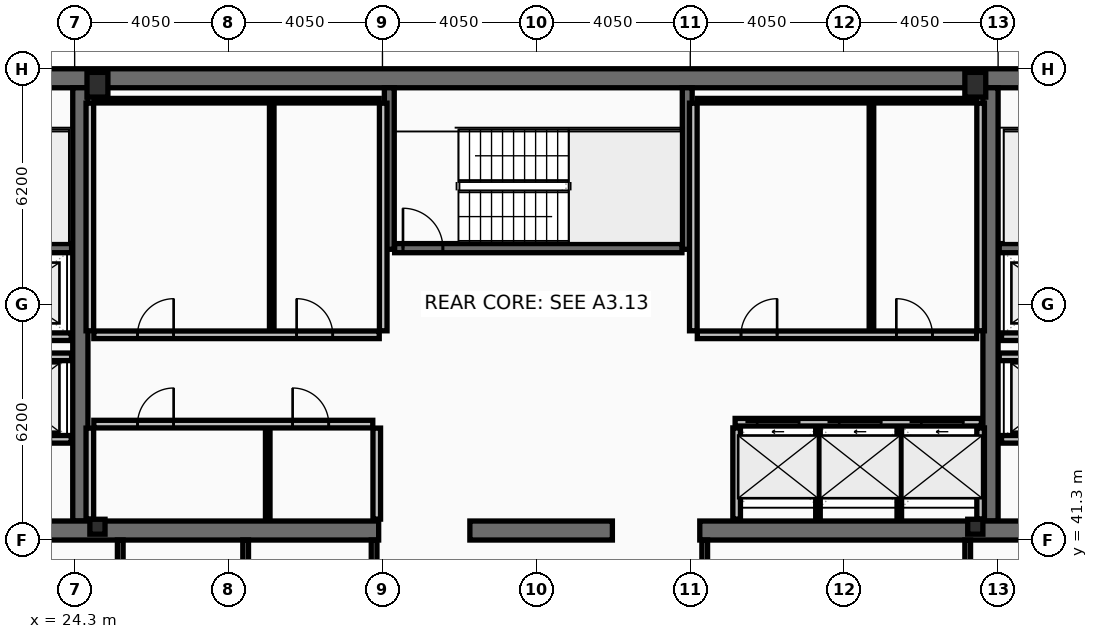
"""IFC4 building model, lengths in metres.
Left out: names, types, materials, properties, quantities, classifications, styles, units other than length and angle.
Written with IfcOpenShell. Run it as: python <this file> out.ifc"""

import sys

from ifc_helpers import new_model, si_unit, direction, frame, frame_2d, origin, origin_2d, place, context, subcontext, project, spatial, rectangle, hollow_rectangle, i_section, extrude, element, fill, save


model = new_model("IFC4")
c1 = context("Model", 3, precision=1e-05, world=origin(), true_north=direction((0.0, 1.0)))
c2 = subcontext(c1, "Body", "Model", "MODEL_VIEW")
j1 = project(units=[si_unit("LENGTHUNIT", "METRE"), si_unit("PLANEANGLEUNIT", "RADIAN")], contexts=[c1])
p1 = place(None, origin())
s1 = spatial("IfcSite", under=j1, at=p1, CompositionType="ELEMENT")
p2 = place(p1, origin())
s2 = spatial("IfcBuilding", under=s1, at=p2, CompositionType="ELEMENT")
p3 = place(p2, frame((0.0, 0.0, 329.0)))
s3 = spatial("IfcBuildingStorey", under=s2, at=p3, CompositionType="ELEMENT", Elevation=329.0)
p4 = place(p3, frame((16.2, 53.45, 0.0), z_axis=(0.0, 0.0, 1.0), x_axis=(1.0, 0.0, 0.0)))
e1 = element("IfcWall", 1, at=p4, inside=s3, PredefinedType="SHEAR", context=c2, shape_type="SweptSolid", body=[
    extrude(rectangle(XDim=40.5, YDim=0.5, at=frame_2d((20.25, 0.0))), origin(), (0.0, 0.0, 1.0), 3.44),
])
for number, where, z_axis, x_axis in (
    (2, (24.45, 41.8, 0.0), (0.0, 0.0, 1.0), (0.0, 1.0, 0.0)),
    (3, (48.4, 41.8, 0.0), (0.0, 0.0, 1.0), (0.0, 1.0, 0.0)),
):
    element("IfcWall", number, at=place(p3, frame(where, z_axis=z_axis, x_axis=x_axis)), inside=s3, PredefinedType="SHEAR", context=c2, shape_type="SweptSolid", body=[
        extrude(rectangle(XDim=11.4, YDim=0.4, at=frame_2d((5.7, 0.0))), origin(), (0.0, 0.0, 1.0), 3.44),
    ])
p5 = place(p3, frame((32.3, 41.55, 0.0), z_axis=(0.0, 0.0, 1.0), x_axis=(-1.0, 0.0, 0.0)))
e4 = element("IfcWall", 4, at=p5, inside=s3, PredefinedType="SHEAR", context=c2, shape_type="SweptSolid", body=[
    extrude(rectangle(XDim=11.45, YDim=0.5, at=frame_2d((5.725, 0.0))), origin(), (0.0, 0.0, 1.0), 3.44),
])
p6 = place(p3, frame((38.45, 41.55, 0.0), z_axis=(0.0, 0.0, 1.0), x_axis=(-1.0, 0.0, 0.0)))
e5 = element("IfcWall", 5, at=p6, inside=s3, PredefinedType="SHEAR", context=c2, shape_type="SweptSolid", body=[
    extrude(rectangle(XDim=3.75, YDim=0.5, at=frame_2d((1.875, 0.0))), origin(), (0.0, 0.0, 1.0), 3.44),
])
p7 = place(p3, frame((52.05, 41.55, 0.0), z_axis=(0.0, 0.0, 1.0), x_axis=(-1.0, 0.0, 0.0)))
e6 = element("IfcWall", 6, at=p7, inside=s3, PredefinedType="SHEAR", context=c2, shape_type="SweptSolid", body=[
    extrude(rectangle(XDim=11.3, YDim=0.5, at=frame_2d((5.65, 0.0))), origin(), (0.0, 0.0, 1.0), 3.44),
])
for number, where, z_axis, x_axis in (
    (7, (32.58, 48.95, 0.0), (0.0, 0.0, 1.0), (0.0, 1.0, 0.0)),
    (8, (40.42, 48.95, 0.0), (0.0, 0.0, 1.0), (0.0, 1.0, 0.0)),
):
    element("IfcWall", number, at=place(p3, frame(where, z_axis=z_axis, x_axis=x_axis)), inside=s3, PredefinedType="SHEAR", context=c2, shape_type="SweptSolid", body=[
        extrude(rectangle(XDim=4.25, YDim=0.26, at=frame_2d((2.125, 0.0))), origin(), (0.0, 0.0, 1.0), 3.44),
    ])
p8 = place(p3, frame((16.7, 48.98, 0.0), z_axis=(0.0, 0.0, 1.0), x_axis=(1.0, 0.0, 0.0)))
e9 = element("IfcWall", 9, at=p8, inside=s3, PredefinedType="SHEAR", context=c2, shape_type="SweptSolid", body=[
    extrude(rectangle(XDim=7.52, YDim=0.24, at=frame_2d((3.76, 0.0))), origin(), (0.0, 0.0, 1.0), 3.44),
])
p9 = place(p8, frame((0.22, 0.0, 0.0)))
e10 = element("IfcOpeningElement", 10, at=p9, cuts=e9, PredefinedType="OPENING", context=c2, shape_type="SweptSolid", body=[
    extrude(rectangle(XDim=1.05, YDim=2.15, at=frame_2d((0.525, 1.075))), frame((0.0, 0.13, 0.0), z_axis=(0.0, -1.0, 0.0), x_axis=(1.0, 0.0, 0.0)), (0.0, 0.0, 1.0), 0.26),
])
p10 = place(p3, frame((48.63, 48.98, 0.0), z_axis=(0.0, 0.0, 1.0), x_axis=(1.0, 0.0, 0.0)))
e11 = element("IfcWall", 11, at=p10, inside=s3, PredefinedType="SHEAR", context=c2, shape_type="SweptSolid", body=[
    extrude(rectangle(XDim=7.57, YDim=0.24, at=frame_2d((3.785, 0.0))), origin(), (0.0, 0.0, 1.0), 3.44),
])
p11 = place(p10, frame((6.3, 0.0, 0.0)))
e12 = element("IfcOpeningElement", 12, at=p11, cuts=e11, PredefinedType="OPENING", context=c2, shape_type="SweptSolid", body=[
    extrude(rectangle(XDim=1.05, YDim=2.15, at=frame_2d((0.525, 1.075))), frame((0.0, 0.13, 0.0), z_axis=(0.0, -1.0, 0.0), x_axis=(1.0, 0.0, 0.0)), (0.0, 0.0, 1.0), 0.26),
])
p12 = place(p3, frame((32.72, 48.98, 0.0), z_axis=(0.0, 0.0, 1.0), x_axis=(1.0, 0.0, 0.0)))
e13 = element("IfcWall", 13, at=p12, inside=s3, PredefinedType="SHEAR", context=c2, shape_type="SweptSolid", body=[
    extrude(rectangle(XDim=7.56, YDim=0.24, at=frame_2d((3.78, 0.0))), origin(), (0.0, 0.0, 1.0), 3.44),
])
p13 = place(p12, frame((0.22, 0.0, 0.0)))
e14 = element("IfcOpeningElement", 14, at=p13, cuts=e13, PredefinedType="OPENING", context=c2, shape_type="SweptSolid", body=[
    extrude(rectangle(XDim=1.05, YDim=2.15, at=frame_2d((0.525, 1.075))), frame((0.0, 0.13, 0.0), z_axis=(0.0, -1.0, 0.0), x_axis=(1.0, 0.0, 0.0)), (0.0, 0.0, 1.0), 0.26),
])
for number, where, z_axis, x_axis in (
    (15, (24.9, 53.28, 0.0), (0.0, 0.0, 1.0), (1.0, 0.0, 0.0)),
    (16, (48.0, 53.28, 0.0), (0.0, 0.0, 1.0), (1.0, 0.0, 0.0)),
):
    element("IfcColumn", number, at=place(p3, frame(where, z_axis=z_axis, x_axis=x_axis)), inside=s3, PredefinedType="COLUMN", context=c2, shape_type="SweptSolid", body=[
        extrude(hollow_rectangle(XDim=0.55, YDim=0.65, WallThickness=0.04, at=origin_2d()), origin(), (0.0, 0.0, 1.0), 3.6),
    ])
for number, where, z_axis, x_axis in (
    (17, (24.9, 41.65, 0.0), (0.0, 0.0, 1.0), (1.0, 0.0, 0.0)),
    (18, (48.0, 41.65, 0.0), (0.0, 0.0, 1.0), (1.0, 0.0, 0.0)),
):
    element("IfcColumn", number, at=place(p3, frame(where, z_axis=z_axis, x_axis=x_axis)), inside=s3, PredefinedType="COLUMN", context=c2, shape_type="SweptSolid", body=[
        extrude(i_section(OverallWidth=0.399, OverallDepth=0.393, WebThickness=0.023, FlangeThickness=0.037, at=origin_2d()), origin(), (0.0, 0.0, 1.0), 3.6),
    ])
p14 = place(p3, frame((41.68, 44.4, 0.0), z_axis=(0.0, 0.0, 1.0), x_axis=(1.0, 0.0, 0.0)))
e19 = element("IfcWall", 19, at=p14, inside=s3, PredefinedType="PARTITIONING", context=c2, shape_type="SweptSolid", body=[
    extrude(rectangle(XDim=6.48, YDim=0.2, at=frame_2d((3.24, 0.0))), origin(), (0.0, 0.0, 1.0), 3.44),
])
p15 = place(p14, frame((0.58, 0.0, 0.0)))
e20 = element("IfcOpeningElement", 20, at=p15, cuts=e19, PredefinedType="OPENING", context=c2, shape_type="SweptSolid", body=[
    extrude(rectangle(XDim=1.1, YDim=2.18, at=frame_2d((0.55, 1.09))), frame((0.0, 0.11, 0.0), z_axis=(0.0, -1.0, 0.0), x_axis=(1.0, 0.0, 0.0)), (0.0, 0.0, 1.0), 0.22),
])
p16 = place(p14, frame((2.74, 0.0, 0.0)))
e21 = element("IfcOpeningElement", 21, at=p16, cuts=e19, PredefinedType="OPENING", context=c2, shape_type="SweptSolid", body=[
    extrude(rectangle(XDim=1.1, YDim=2.18, at=frame_2d((0.55, 1.09))), frame((0.0, 0.11, 0.0), z_axis=(0.0, -1.0, 0.0), x_axis=(1.0, 0.0, 0.0)), (0.0, 0.0, 1.0), 0.22),
])
p17 = place(p14, frame((4.9, 0.0, 0.0)))
e22 = element("IfcOpeningElement", 22, at=p17, cuts=e19, PredefinedType="OPENING", context=c2, shape_type="SweptSolid", body=[
    extrude(rectangle(XDim=1.1, YDim=2.18, at=frame_2d((0.55, 1.09))), frame((0.0, 0.11, 0.0), z_axis=(0.0, -1.0, 0.0), x_axis=(1.0, 0.0, 0.0)), (0.0, 0.0, 1.0), 0.22),
])
p18 = place(p3, frame((51.61, 43.95, 0.0), z_axis=(0.0, 0.0, 1.0), x_axis=(-1.0, 0.0, 0.0)))
e23 = element("IfcWall", 23, at=p18, inside=s3, PredefinedType="PARTITIONING", context=c2, shape_type="SweptSolid", body=[
    extrude(rectangle(XDim=2.92, YDim=0.2, at=frame_2d((1.46, 0.0))), origin(), (0.0, 0.0, 1.0), 3.44),
])
p19 = place(p18, frame((0.81, 0.0, 0.0)))
e24 = element("IfcOpeningElement", 24, at=p19, cuts=e23, PredefinedType="OPENING", context=c2, shape_type="SweptSolid", body=[
    extrude(rectangle(XDim=1.3, YDim=2.18, at=frame_2d((0.65, 1.09))), frame((0.0, 0.11, 0.0), z_axis=(0.0, -1.0, 0.0), x_axis=(1.0, 0.0, 0.0)), (0.0, 0.0, 1.0), 0.22),
])
p20 = place(p3, frame((24.21, 43.95, 0.0), z_axis=(0.0, 0.0, 1.0), x_axis=(-1.0, 0.0, 0.0)))
e25 = element("IfcWall", 25, at=p20, inside=s3, PredefinedType="PARTITIONING", context=c2, shape_type="SweptSolid", body=[
    extrude(rectangle(XDim=2.97, YDim=0.2, at=frame_2d((1.485, 0.0))), origin(), (0.0, 0.0, 1.0), 3.44),
])
p21 = place(p20, frame((0.86, 0.0, 0.0)))
e26 = element("IfcOpeningElement", 26, at=p21, cuts=e25, PredefinedType="OPENING", context=c2, shape_type="SweptSolid", body=[
    extrude(rectangle(XDim=1.3, YDim=2.18, at=frame_2d((0.65, 1.09))), frame((0.0, 0.11, 0.0), z_axis=(0.0, -1.0, 0.0), x_axis=(1.0, 0.0, 0.0)), (0.0, 0.0, 1.0), 0.22),
])
p22 = place(p3, frame((51.61, 46.65, 0.0), z_axis=(0.0, 0.0, 1.0), x_axis=(-1.0, 0.0, 0.0)))
e27 = element("IfcWall", 27, at=p22, inside=s3, PredefinedType="PARTITIONING", context=c2, shape_type="SweptSolid", body=[
    extrude(rectangle(XDim=2.92, YDim=0.2, at=frame_2d((1.46, 0.0))), origin(), (0.0, 0.0, 1.0), 3.44),
])
p23 = place(p22, frame((0.86, 0.0, 0.0)))
e28 = element("IfcOpeningElement", 28, at=p23, cuts=e27, PredefinedType="OPENING", context=c2, shape_type="SweptSolid", body=[
    extrude(rectangle(XDim=1.2, YDim=2.18, at=frame_2d((0.6, 1.09))), frame((0.0, 0.11, 0.0), z_axis=(0.0, -1.0, 0.0), x_axis=(1.0, 0.0, 0.0)), (0.0, 0.0, 1.0), 0.22),
])
p24 = place(p3, frame((24.21, 46.65, 0.0), z_axis=(0.0, 0.0, 1.0), x_axis=(-1.0, 0.0, 0.0)))
e29 = element("IfcWall", 29, at=p24, inside=s3, PredefinedType="PARTITIONING", context=c2, shape_type="SweptSolid", body=[
    extrude(rectangle(XDim=2.97, YDim=0.2, at=frame_2d((1.485, 0.0))), origin(), (0.0, 0.0, 1.0), 3.44),
])
p25 = place(p24, frame((0.91, 0.0, 0.0)))
e30 = element("IfcOpeningElement", 30, at=p25, cuts=e29, PredefinedType="OPENING", context=c2, shape_type="SweptSolid", body=[
    extrude(rectangle(XDim=1.2, YDim=2.18, at=frame_2d((0.6, 1.09))), frame((0.0, 0.11, 0.0), z_axis=(0.0, -1.0, 0.0), x_axis=(1.0, 0.0, 0.0)), (0.0, 0.0, 1.0), 0.22),
])
p26 = place(p3, frame((21.2, 46.12, 0.0), z_axis=(0.0, 0.0, 1.0), x_axis=(1.0, 0.0, 0.0)))
e31 = element("IfcWall", 31, at=p26, inside=s3, PredefinedType="PARTITIONING", context=c2, shape_type="SweptSolid", body=[
    extrude(rectangle(XDim=3.02, YDim=0.2, at=frame_2d((1.51, 0.0))), origin(), (0.0, 0.0, 1.0), 3.44),
])
p27 = place(p3, frame((48.63, 46.12, 0.0), z_axis=(0.0, 0.0, 1.0), x_axis=(1.0, 0.0, 0.0)))
e32 = element("IfcWall", 32, at=p27, inside=s3, PredefinedType="PARTITIONING", context=c2, shape_type="SweptSolid", body=[
    extrude(rectangle(XDim=3.07, YDim=0.2, at=frame_2d((1.535, 0.0))), origin(), (0.0, 0.0, 1.0), 3.44),
])
for number, where, z_axis, x_axis in (
    (33, (24.7, 46.805, 0.0), (0.0, 0.0, 1.0), (0.0, 1.0, 0.0)),
    (34, (32.42, 46.805, 0.0), (0.0, 0.0, 1.0), (0.0, 1.0, 0.0)),
):
    element("IfcWall", number, at=place(p3, frame(where, z_axis=z_axis, x_axis=x_axis)), inside=s3, PredefinedType="PARTITIONING", context=c2, shape_type="SweptSolid", body=[
        extrude(rectangle(XDim=5.99, YDim=0.2, at=frame_2d((2.995, 0.0))), origin(), (0.0, 0.0, 1.0), 3.44),
    ])
p28 = place(p3, frame((24.805, 52.86, 0.0), z_axis=(0.0, 0.0, 1.0), x_axis=(1.0, 0.0, 0.0)))
e35 = element("IfcWall", 35, at=p28, inside=s3, PredefinedType="PARTITIONING", context=c2, shape_type="SweptSolid", body=[
    extrude(rectangle(XDim=7.51, YDim=0.12, at=frame_2d((3.755, 0.0))), origin(), (0.0, 0.0, 1.0), 3.44),
])
p29 = place(p3, frame((29.486, 46.805, 0.0), z_axis=(0.0, 0.0, 1.0), x_axis=(0.0, 1.0, 0.0)))
e36 = element("IfcWall", 36, at=p29, inside=s3, PredefinedType="PARTITIONING", context=c2, shape_type="SweptSolid", body=[
    extrude(rectangle(XDim=5.99, YDim=0.12, at=frame_2d((2.995, 0.0))), origin(), (0.0, 0.0, 1.0), 3.44),
])
p30 = place(p3, frame((24.805, 46.7, 0.0), z_axis=(0.0, 0.0, 1.0), x_axis=(1.0, 0.0, 0.0)))
e37 = element("IfcWall", 37, at=p30, inside=s3, PredefinedType="PARTITIONING", context=c2, shape_type="SweptSolid", body=[
    extrude(rectangle(XDim=7.51, YDim=0.2, at=frame_2d((3.755, 0.0))), origin(), (0.0, 0.0, 1.0), 3.44),
])
p31 = place(p30, frame((1.15, 0.0, 0.0)))
e38 = element("IfcOpeningElement", 38, at=p31, cuts=e37, PredefinedType="OPENING", context=c2, shape_type="SweptSolid", body=[
    extrude(rectangle(XDim=0.95, YDim=2.1, at=frame_2d((0.475, 1.05))), frame((0.0, 0.11, 0.0), z_axis=(0.0, -1.0, 0.0), x_axis=(1.0, 0.0, 0.0)), (0.0, 0.0, 1.0), 0.22),
])
p32 = place(p30, frame((5.336, 0.0, 0.0)))
e39 = element("IfcOpeningElement", 39, at=p32, cuts=e37, PredefinedType="OPENING", context=c2, shape_type="SweptSolid", body=[
    extrude(rectangle(XDim=0.95, YDim=2.1, at=frame_2d((0.475, 1.05))), frame((0.0, 0.11, 0.0), z_axis=(0.0, -1.0, 0.0), x_axis=(1.0, 0.0, 0.0)), (0.0, 0.0, 1.0), 0.22),
])
for number, where, z_axis, x_axis in (
    (40, (24.7, 41.85, 0.0), (0.0, 0.0, 1.0), (0.0, 1.0, 0.0)),
    (41, (32.25, 41.85, 0.0), (0.0, 0.0, 1.0), (0.0, 1.0, 0.0)),
):
    element("IfcWall", number, at=place(p3, frame(where, z_axis=z_axis, x_axis=x_axis)), inside=s3, PredefinedType="PARTITIONING", context=c2, shape_type="SweptSolid", body=[
        extrude(rectangle(XDim=2.395, YDim=0.2, at=frame_2d((1.198, 0.0))), origin(), (0.0, 0.0, 1.0), 3.44),
    ])
p33 = place(p3, frame((29.381, 41.85, 0.0), z_axis=(0.0, 0.0, 1.0), x_axis=(0.0, 1.0, 0.0)))
e42 = element("IfcWall", 42, at=p33, inside=s3, PredefinedType="PARTITIONING", context=c2, shape_type="SweptSolid", body=[
    extrude(rectangle(XDim=2.395, YDim=0.12, at=frame_2d((1.198, 0.0))), origin(), (0.0, 0.0, 1.0), 3.44),
])
p34 = place(p3, frame((24.805, 44.35, 0.0), z_axis=(0.0, 0.0, 1.0), x_axis=(1.0, 0.0, 0.0)))
e43 = element("IfcWall", 43, at=p34, inside=s3, PredefinedType="PARTITIONING", context=c2, shape_type="SweptSolid", body=[
    extrude(rectangle(XDim=7.34, YDim=0.2, at=frame_2d((3.67, 0.0))), origin(), (0.0, 0.0, 1.0), 3.44),
])
p35 = place(p34, frame((1.15, 0.0, 0.0)))
e44 = element("IfcOpeningElement", 44, at=p35, cuts=e43, PredefinedType="OPENING", context=c2, shape_type="SweptSolid", body=[
    extrude(rectangle(XDim=0.95, YDim=2.1, at=frame_2d((0.475, 1.05))), frame((0.0, 0.11, 0.0), z_axis=(0.0, -1.0, 0.0), x_axis=(1.0, 0.0, 0.0)), (0.0, 0.0, 1.0), 0.22),
])
p36 = place(p34, frame((5.231, 0.0, 0.0)))
e45 = element("IfcOpeningElement", 45, at=p36, cuts=e43, PredefinedType="OPENING", context=c2, shape_type="SweptSolid", body=[
    extrude(rectangle(XDim=0.95, YDim=2.1, at=frame_2d((0.475, 1.05))), frame((0.0, 0.11, 0.0), z_axis=(0.0, -1.0, 0.0), x_axis=(1.0, 0.0, 0.0)), (0.0, 0.0, 1.0), 0.22),
])
for number, where, z_axis, x_axis in (
    (46, (40.58, 46.805, 0.0), (0.0, 0.0, 1.0), (0.0, 1.0, 0.0)),
    (47, (48.14, 46.805, 0.0), (0.0, 0.0, 1.0), (0.0, 1.0, 0.0)),
):
    element("IfcWall", number, at=place(p3, frame(where, z_axis=z_axis, x_axis=x_axis)), inside=s3, PredefinedType="PARTITIONING", context=c2, shape_type="SweptSolid", body=[
        extrude(rectangle(XDim=5.99, YDim=0.2, at=frame_2d((2.995, 0.0))), origin(), (0.0, 0.0, 1.0), 3.44),
    ])
p37 = place(p3, frame((40.685, 52.86, 0.0), z_axis=(0.0, 0.0, 1.0), x_axis=(1.0, 0.0, 0.0)))
e48 = element("IfcWall", 48, at=p37, inside=s3, PredefinedType="PARTITIONING", context=c2, shape_type="SweptSolid", body=[
    extrude(rectangle(XDim=7.35, YDim=0.12, at=frame_2d((3.675, 0.0))), origin(), (0.0, 0.0, 1.0), 3.44),
])
p38 = place(p3, frame((45.267, 46.805, 0.0), z_axis=(0.0, 0.0, 1.0), x_axis=(0.0, 1.0, 0.0)))
e49 = element("IfcWall", 49, at=p38, inside=s3, PredefinedType="PARTITIONING", context=c2, shape_type="SweptSolid", body=[
    extrude(rectangle(XDim=5.99, YDim=0.12, at=frame_2d((2.995, 0.0))), origin(), (0.0, 0.0, 1.0), 3.44),
])
p39 = place(p3, frame((40.685, 46.7, 0.0), z_axis=(0.0, 0.0, 1.0), x_axis=(1.0, 0.0, 0.0)))
e50 = element("IfcWall", 50, at=p39, inside=s3, PredefinedType="PARTITIONING", context=c2, shape_type="SweptSolid", body=[
    extrude(rectangle(XDim=7.35, YDim=0.2, at=frame_2d((3.675, 0.0))), origin(), (0.0, 0.0, 1.0), 3.44),
])
p40 = place(p39, frame((1.15, 0.0, 0.0)))
e51 = element("IfcOpeningElement", 51, at=p40, cuts=e50, PredefinedType="OPENING", context=c2, shape_type="SweptSolid", body=[
    extrude(rectangle(XDim=0.95, YDim=2.1, at=frame_2d((0.475, 1.05))), frame((0.0, 0.11, 0.0), z_axis=(0.0, -1.0, 0.0), x_axis=(1.0, 0.0, 0.0)), (0.0, 0.0, 1.0), 0.22),
])
p41 = place(p39, frame((5.237, 0.0, 0.0)))
e52 = element("IfcOpeningElement", 52, at=p41, cuts=e50, PredefinedType="OPENING", context=c2, shape_type="SweptSolid", body=[
    extrude(rectangle(XDim=0.95, YDim=2.1, at=frame_2d((0.475, 1.05))), frame((0.0, 0.11, 0.0), z_axis=(0.0, -1.0, 0.0), x_axis=(1.0, 0.0, 0.0)), (0.0, 0.0, 1.0), 0.22),
])
for number, where, z_axis, x_axis in (
    (53, (41.72, 41.85, 0.0), (0.0, 0.0, 1.0), (0.0, 1.0, 0.0)),
    (54, (48.14, 41.85, 0.0), (0.0, 0.0, 1.0), (0.0, 1.0, 0.0)),
):
    element("IfcWall", number, at=place(p3, frame(where, z_axis=z_axis, x_axis=x_axis)), inside=s3, PredefinedType="PARTITIONING", context=c2, shape_type="SweptSolid", body=[
        extrude(rectangle(XDim=2.4, YDim=0.2, at=frame_2d((1.2, 0.0))), origin(), (0.0, 0.0, 1.0), 3.44),
    ])
for number, where, z_axis, x_axis in (
    (55, (43.86, 41.85, 0.0), (0.0, 0.0, 1.0), (0.0, 1.0, 0.0)),
    (56, (46.0, 41.85, 0.0), (0.0, 0.0, 1.0), (0.0, 1.0, 0.0)),
):
    element("IfcWall", number, at=place(p3, frame(where, z_axis=z_axis, x_axis=x_axis)), inside=s3, PredefinedType="PARTITIONING", context=c2, shape_type="SweptSolid", body=[
        extrude(rectangle(XDim=2.4, YDim=0.12, at=frame_2d((1.2, 0.0))), origin(), (0.0, 0.0, 1.0), 3.44),
    ])
for number, where, z_axis, x_axis in (
    (57, (25.5, 38.28, 0.0), (0.0, 0.0, 1.0), (0.0, 1.0, 0.0)),
    (58, (28.8, 38.28, 0.0), (0.0, 0.0, 1.0), (0.0, 1.0, 0.0)),
    (59, (32.18, 38.28, 0.0), (0.0, 0.0, 1.0), (0.0, 1.0, 0.0)),
    (60, (40.88, 38.28, 0.0), (0.0, 0.0, 1.0), (0.0, 1.0, 0.0)),
):
    element("IfcWall", number, at=place(p3, frame(where, z_axis=z_axis, x_axis=x_axis)), inside=s3, PredefinedType="PARTITIONING", context=c2, shape_type="SweptSolid", body=[
        extrude(rectangle(XDim=3.02, YDim=0.15, at=frame_2d((1.51, 0.0))), origin(), (0.0, 0.0, 1.0), 3.44),
    ])
p42 = place(p3, frame((47.8, 38.28, 0.0), z_axis=(0.0, 0.0, 1.0), x_axis=(0.0, 1.0, 0.0)))
e61 = element("IfcWall", 61, at=p42, inside=s3, PredefinedType="PARTITIONING", context=c2, shape_type="SweptSolid", body=[
    extrude(rectangle(XDim=3.02, YDim=0.15, at=frame_2d((1.51, 0.0))), origin(), (0.0, 0.0, 1.0), 2.83),
])
p43 = place(p13, origin())
e62 = element("IfcDoor", 62, at=p43, inside=s3, OperationType="SINGLE_SWING_LEFT", PredefinedType="DOOR", context=c2, shape_type="SweptSolid", body=[
    extrude(rectangle(XDim=1.05, YDim=2.15, at=frame_2d((0.525, 1.075))), frame((0.0, 0.025, 0.0), z_axis=(0.0, -1.0, 0.0), x_axis=(1.0, 0.0, 0.0)), (0.0, 0.0, 1.0), 0.05),
])
fill(e14, e62)
p44 = place(p15, origin())
e63 = element("IfcDoor", 63, at=p44, inside=s3, OperationType="SLIDING_TO_LEFT", PredefinedType="DOOR", context=c2, shape_type="SweptSolid", body=[
    extrude(rectangle(XDim=1.1, YDim=2.18, at=frame_2d((0.55, 1.09))), frame((0.0, 0.025, 0.0), z_axis=(0.0, -1.0, 0.0), x_axis=(1.0, 0.0, 0.0)), (0.0, 0.0, 1.0), 0.05),
])
fill(e20, e63)
p45 = place(p16, origin())
e64 = element("IfcDoor", 64, at=p45, inside=s3, OperationType="SLIDING_TO_LEFT", PredefinedType="DOOR", context=c2, shape_type="SweptSolid", body=[
    extrude(rectangle(XDim=1.1, YDim=2.18, at=frame_2d((0.55, 1.09))), frame((0.0, 0.025, 0.0), z_axis=(0.0, -1.0, 0.0), x_axis=(1.0, 0.0, 0.0)), (0.0, 0.0, 1.0), 0.05),
])
fill(e21, e64)
p46 = place(p17, origin())
e65 = element("IfcDoor", 65, at=p46, inside=s3, OperationType="SLIDING_TO_LEFT", PredefinedType="DOOR", context=c2, shape_type="SweptSolid", body=[
    extrude(rectangle(XDim=1.1, YDim=2.18, at=frame_2d((0.55, 1.09))), frame((0.0, 0.025, 0.0), z_axis=(0.0, -1.0, 0.0), x_axis=(1.0, 0.0, 0.0)), (0.0, 0.0, 1.0), 0.05),
])
fill(e22, e65)
p47 = place(p31, origin())
e66 = element("IfcDoor", 66, at=p47, inside=s3, OperationType="SINGLE_SWING_RIGHT", PredefinedType="DOOR", context=c2, shape_type="SweptSolid", body=[
    extrude(rectangle(XDim=0.95, YDim=2.1, at=frame_2d((0.475, 1.05))), frame((0.0, 0.025, 0.0), z_axis=(0.0, -1.0, 0.0), x_axis=(1.0, 0.0, 0.0)), (0.0, 0.0, 1.0), 0.05),
])
fill(e38, e66)
p48 = place(p32, origin())
e67 = element("IfcDoor", 67, at=p48, inside=s3, OperationType="SINGLE_SWING_LEFT", PredefinedType="DOOR", context=c2, shape_type="SweptSolid", body=[
    extrude(rectangle(XDim=0.95, YDim=2.1, at=frame_2d((0.475, 1.05))), frame((0.0, 0.025, 0.0), z_axis=(0.0, -1.0, 0.0), x_axis=(1.0, 0.0, 0.0)), (0.0, 0.0, 1.0), 0.05),
])
fill(e39, e67)
p49 = place(p35, origin())
e68 = element("IfcDoor", 68, at=p49, inside=s3, OperationType="SINGLE_SWING_RIGHT", PredefinedType="DOOR", context=c2, shape_type="SweptSolid", body=[
    extrude(rectangle(XDim=0.95, YDim=2.1, at=frame_2d((0.475, 1.05))), frame((0.0, 0.025, 0.0), z_axis=(0.0, -1.0, 0.0), x_axis=(1.0, 0.0, 0.0)), (0.0, 0.0, 1.0), 0.05),
])
fill(e44, e68)
p50 = place(p36, origin())
e69 = element("IfcDoor", 69, at=p50, inside=s3, OperationType="SINGLE_SWING_LEFT", PredefinedType="DOOR", context=c2, shape_type="SweptSolid", body=[
    extrude(rectangle(XDim=0.95, YDim=2.1, at=frame_2d((0.475, 1.05))), frame((0.0, 0.025, 0.0), z_axis=(0.0, -1.0, 0.0), x_axis=(1.0, 0.0, 0.0)), (0.0, 0.0, 1.0), 0.05),
])
fill(e45, e69)
p51 = place(p40, origin())
e70 = element("IfcDoor", 70, at=p51, inside=s3, OperationType="SINGLE_SWING_RIGHT", PredefinedType="DOOR", context=c2, shape_type="SweptSolid", body=[
    extrude(rectangle(XDim=0.95, YDim=2.1, at=frame_2d((0.475, 1.05))), frame((0.0, 0.025, 0.0), z_axis=(0.0, -1.0, 0.0), x_axis=(1.0, 0.0, 0.0)), (0.0, 0.0, 1.0), 0.05),
])
fill(e51, e70)
p52 = place(p41, origin())
e71 = element("IfcDoor", 71, at=p52, inside=s3, OperationType="SINGLE_SWING_LEFT", PredefinedType="DOOR", context=c2, shape_type="SweptSolid", body=[
    extrude(rectangle(XDim=0.95, YDim=2.1, at=frame_2d((0.475, 1.05))), frame((0.0, 0.025, 0.0), z_axis=(0.0, -1.0, 0.0), x_axis=(1.0, 0.0, 0.0)), (0.0, 0.0, 1.0), 0.05),
])
fill(e52, e71)
save(model, sys.argv[1])
